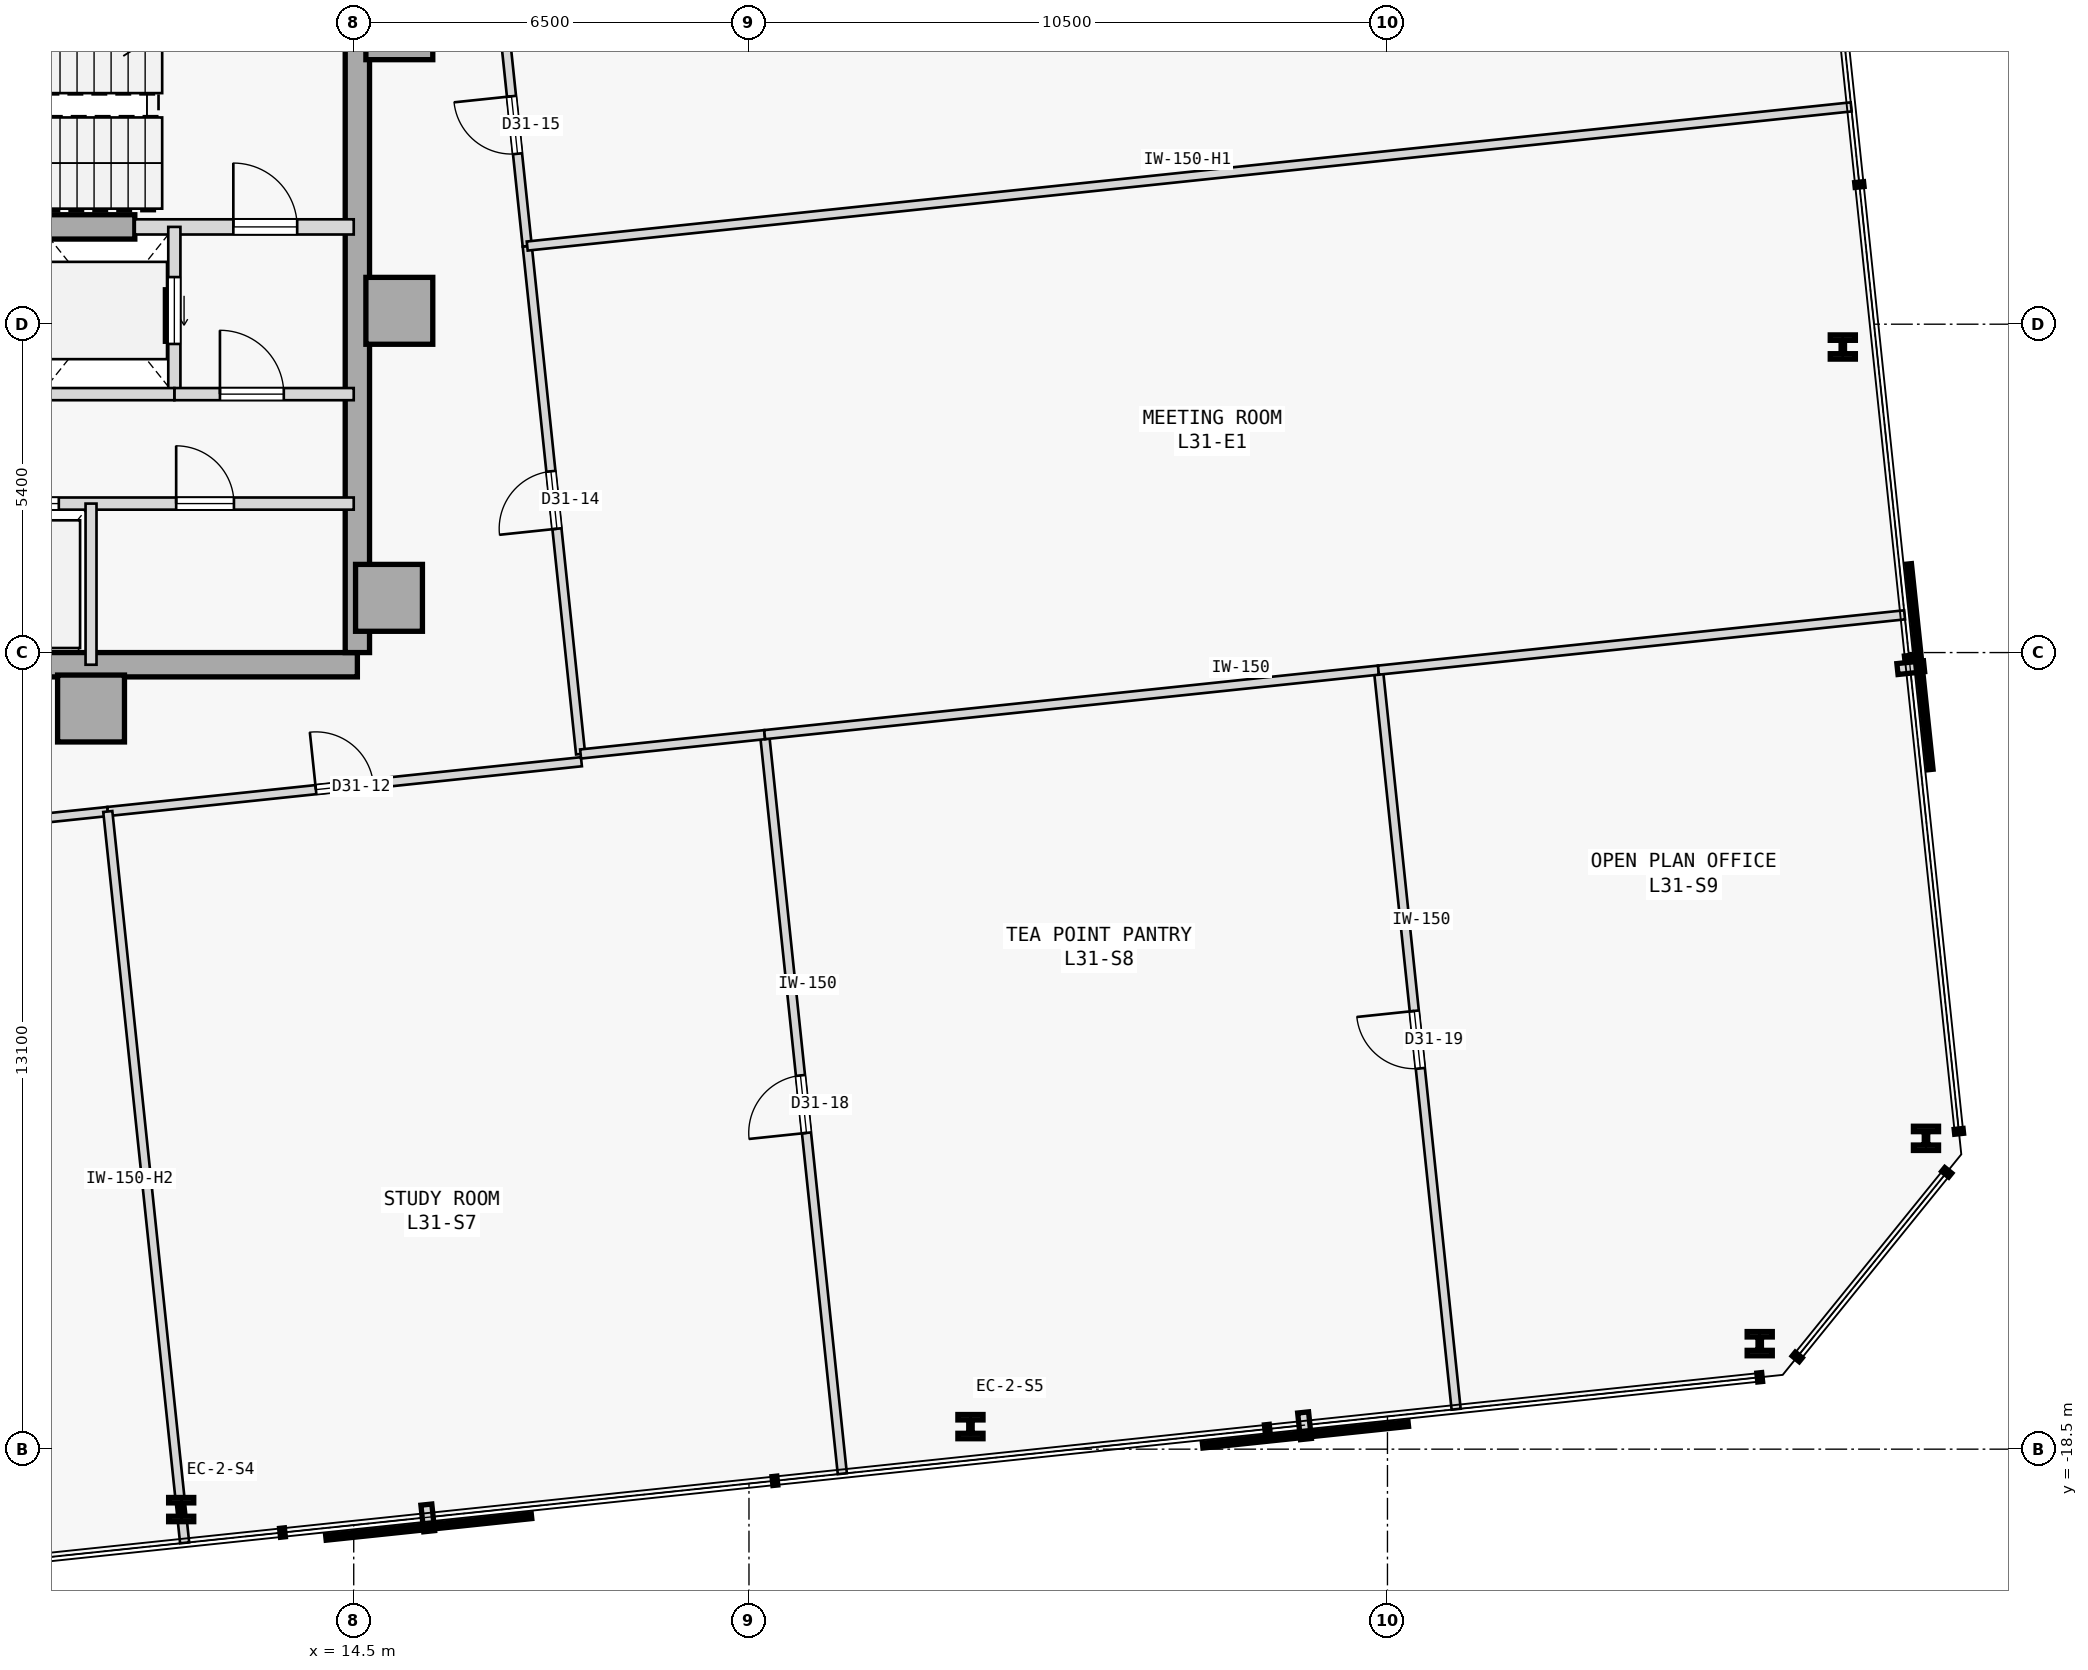
"""IFC4 building model, lengths in metres.
Left out: names, types, materials, properties, quantities, classifications, styles, units other than length and angle.
Written with IfcOpenShell. Run it as: python <this file> out.ifc"""

import sys

from ifc_helpers import new_model, si_unit, direction, frame, frame_2d, origin, origin_2d, place, context, subcontext, project, spatial, rectangle, i_section, extrude, element, fill, save


model = new_model("IFC4")
c1 = context("Model", 3, precision=1e-05, world=origin(), true_north=direction((0.0, 1.0)))
c2 = subcontext(c1, "Body", "Model", "MODEL_VIEW")
j1 = project(units=[si_unit("LENGTHUNIT", "METRE"), si_unit("PLANEANGLEUNIT", "RADIAN")], contexts=[c1])
p1 = place(None, origin())
s1 = spatial("IfcSite", under=j1, at=p1, CompositionType="ELEMENT")
p2 = place(p1, origin())
s2 = spatial("IfcBuilding", under=s1, at=p2, CompositionType="ELEMENT")
p3 = place(p2, frame((0.0, 0.0, 124.4)))
s3 = spatial("IfcBuildingStorey", under=s2, at=p3, CompositionType="ELEMENT", Elevation=124.4)
for number, where, z_axis, x_axis in (
    (1, (15.25, 4.9, 0.0), (0.0, 0.0, 1.0), (1.0, 0.0, 0.0)),
    (2, (15.25, 0.22, 0.0), (0.0, 0.0, 1.0), (1.0, 0.0, 0.0)),
    (3, (15.08, -4.5, 0.0), (0.0, 0.0, 1.0), (1.0, 0.0, 0.0)),
    (4, (10.18, -6.32, 0.0), (0.0, 0.0, 1.0), (1.0, 0.0, 0.0)),
):
    element("IfcColumn", number, at=place(p3, frame(where, z_axis=z_axis, x_axis=x_axis)), inside=s3, PredefinedType="COLUMN", context=c2, shape_type="SweptSolid", body=[
        extrude(rectangle(XDim=1.1, YDim=1.1, at=origin_2d()), origin(), (0.0, 0.0, 1.0), 3.7),
    ])
p4 = place(p3, frame((3.7, -5.6, 0.0), z_axis=(0.0, 0.0, 1.0), x_axis=(1.0, 0.0, 0.0)))
e5 = element("IfcWall", 5, at=p4, inside=s3, PredefinedType="SHEAR", context=c2, shape_type="SweptSolid", body=[
    extrude(rectangle(XDim=10.86, YDim=0.4, at=frame_2d((5.43, 0.0))), origin(), (0.0, 0.0, 1.0), 3.475),
])
p5 = place(p3, frame((14.56, -5.4, 0.0), z_axis=(0.0, 0.0, 1.0), x_axis=(0.0, 1.0, 0.0)))
e6 = element("IfcWall", 6, at=p5, inside=s3, PredefinedType="SHEAR", context=c2, shape_type="SweptSolid", body=[
    extrude(rectangle(XDim=10.8, YDim=0.4, at=frame_2d((5.4, 0.0))), origin(), (0.0, 0.0, 1.0), 3.475),
])
p6 = place(p3, frame((5.75, 1.6, 0.0), z_axis=(0.0, 0.0, 1.0), x_axis=(1.0, 0.0, 0.0)))
e7 = element("IfcWall", 7, at=p6, inside=s3, PredefinedType="SHEAR", context=c2, shape_type="SweptSolid", body=[
    extrude(rectangle(XDim=5.15, YDim=0.4, at=frame_2d((2.575, 0.0))), origin(), (0.0, 0.0, 1.0), 3.475),
])
for number, where, z_axis, x_axis in (
    (8, (11.663, -19.494, 0.0), (0.0, 0.0, 1.0), (1.0, 0.0, 0.0)),
    (9, (24.642, -18.129, 0.0), (0.0, 0.0, 1.0), (1.0, 0.0, 0.0)),
    (10, (37.622, -16.765, 0.0), (0.0, 0.0, 1.0), (1.0, 0.0, 0.0)),
    (11, (40.356, -13.389, 0.0), (0.0, 0.0, 1.0), (1.0, 0.0, 0.0)),
    (12, (38.988, -0.375, 0.0), (0.0, 0.0, 1.0), (1.0, 0.0, 0.0)),
):
    element("IfcColumn", number, at=place(p3, frame(where, z_axis=z_axis, x_axis=x_axis)), inside=s3, PredefinedType="COLUMN", context=c2, shape_type="SweptSolid", body=[
        extrude(i_section(OverallWidth=0.413, OverallDepth=0.398, WebThickness=0.056, FlangeThickness=0.089, FilletRadius=0.015, at=origin_2d()), origin(), (0.0, 0.0, 1.0), 3.7),
    ])
p7 = place(p3, frame((10.9, 1.6, 0.0), z_axis=(0.0, 0.0, 1.0), x_axis=(1.0, 0.0, 0.0)))
e13 = element("IfcWall", 13, at=p7, inside=s3, PredefinedType="STANDARD", context=c2, shape_type="SweptSolid", body=[
    extrude(rectangle(XDim=3.6, YDim=0.25, at=frame_2d((1.8, 0.0))), origin(), (0.0, 0.0, 1.0), 3.475),
])
p8 = place(p7, frame((1.62, 0.0, 0.0)))
e14 = element("IfcOpeningElement", 14, at=p8, cuts=e13, PredefinedType="OPENING", context=c2, shape_type="SweptSolid", body=[
    extrude(rectangle(XDim=1.05, YDim=2.15, at=frame_2d((0.525, 1.075))), frame((0.0, 0.135, 0.0), z_axis=(0.0, -1.0, 0.0), x_axis=(1.0, 0.0, 0.0)), (0.0, 0.0, 1.0), 0.27),
])
p9 = place(p3, frame((11.55, -1.15, 0.0), z_axis=(0.0, 0.0, 1.0), x_axis=(0.0, 1.0, 0.0)))
e15 = element("IfcWall", 15, at=p9, inside=s3, PredefinedType="STANDARD", context=c2, shape_type="SweptSolid", body=[
    extrude(rectangle(XDim=2.75, YDim=0.2, at=frame_2d((1.375, 0.0))), origin(), (0.0, 0.0, 1.0), 3.475),
])
p10 = place(p9, frame((0.825, 0.0, 0.0)))
e16 = element("IfcOpeningElement", 16, at=p10, cuts=e15, PredefinedType="OPENING", context=c2, shape_type="SweptSolid", body=[
    extrude(rectangle(XDim=1.1, YDim=2.15, at=frame_2d((0.55, 1.075))), frame((0.0, 0.11, 0.0), z_axis=(0.0, -1.0, 0.0), x_axis=(1.0, 0.0, 0.0)), (0.0, 0.0, 1.0), 0.22),
])
p11 = place(p3, frame((11.55, -1.15, 0.0), z_axis=(0.0, 0.0, 1.0), x_axis=(1.0, 0.0, 0.0)))
e17 = element("IfcWall", 17, at=p11, inside=s3, PredefinedType="STANDARD", context=c2, shape_type="SweptSolid", body=[
    extrude(rectangle(XDim=2.95, YDim=0.2, at=frame_2d((1.475, 0.0))), origin(), (0.0, 0.0, 1.0), 3.475),
])
p12 = place(p11, frame((0.75, 0.0, 0.0)))
e18 = element("IfcOpeningElement", 18, at=p12, cuts=e17, PredefinedType="OPENING", context=c2, shape_type="SweptSolid", body=[
    extrude(rectangle(XDim=1.05, YDim=2.18, at=frame_2d((0.525, 1.09))), frame((0.0, 0.11, 0.0), z_axis=(0.0, -1.0, 0.0), x_axis=(1.0, 0.0, 0.0)), (0.0, 0.0, 1.0), 0.22),
])
p13 = place(p3, frame((9.35, -1.15, 0.0), z_axis=(0.0, 0.0, 1.0), x_axis=(1.0, 0.0, 0.0)))
e19 = element("IfcWall", 19, at=p13, inside=s3, PredefinedType="STANDARD", context=c2, shape_type="SweptSolid", body=[
    extrude(rectangle(XDim=2.2, YDim=0.2, at=frame_2d((1.1, 0.0))), origin(), (0.0, 0.0, 1.0), 3.475),
])
p14 = place(p3, frame((3.7, -2.95, 0.0), z_axis=(0.0, 0.0, 1.0), x_axis=(1.0, 0.0, 0.0)))
e20 = element("IfcWall", 20, at=p14, inside=s3, PredefinedType="STANDARD", context=c2, shape_type="SweptSolid", body=[
    extrude(rectangle(XDim=10.8, YDim=0.2, at=frame_2d((5.4, 0.0))), origin(), (0.0, 0.0, 1.0), 3.475),
])
p15 = place(p14, frame((2.69, 0.0, 0.0)))
e21 = element("IfcOpeningElement", 21, at=p15, cuts=e20, PredefinedType="OPENING", context=c2, shape_type="SweptSolid", body=[
    extrude(rectangle(XDim=1.1, YDim=2.15, at=frame_2d((0.55, 1.075))), frame((0.0, 0.11, 0.0), z_axis=(0.0, -1.0, 0.0), x_axis=(1.0, 0.0, 0.0)), (0.0, 0.0, 1.0), 0.22),
])
p16 = place(p14, frame((4.85, 0.0, 0.0)))
e22 = element("IfcOpeningElement", 22, at=p16, cuts=e20, PredefinedType="OPENING", context=c2, shape_type="SweptSolid", body=[
    extrude(rectangle(XDim=1.1, YDim=2.15, at=frame_2d((0.55, 1.075))), frame((0.0, 0.11, 0.0), z_axis=(0.0, -1.0, 0.0), x_axis=(1.0, 0.0, 0.0)), (0.0, 0.0, 1.0), 0.22),
])
p17 = place(p14, frame((7.88, 0.0, 0.0)))
e23 = element("IfcOpeningElement", 23, at=p17, cuts=e20, PredefinedType="OPENING", context=c2, shape_type="SweptSolid", body=[
    extrude(rectangle(XDim=0.95, YDim=2.15, at=frame_2d((0.475, 1.075))), frame((0.0, 0.11, 0.0), z_axis=(0.0, -1.0, 0.0), x_axis=(1.0, 0.0, 0.0)), (0.0, 0.0, 1.0), 0.22),
])
p18 = place(p3, frame((10.18, -5.6, 0.0), z_axis=(0.0, 0.0, 1.0), x_axis=(0.0, 1.0, 0.0)))
e24 = element("IfcWall", 24, at=p18, inside=s3, PredefinedType="STANDARD", context=c2, shape_type="SweptSolid", body=[
    extrude(rectangle(XDim=2.65, YDim=0.18, at=frame_2d((1.325, 0.0))), origin(), (0.0, 0.0, 1.0), 3.475),
])
p19 = place(p3, frame((-1.081, -9.226, 0.0), z_axis=(0.0, 0.0, 1.0), x_axis=(0.994523198252, 0.104516066418, 0.0)))
e25 = element("IfcWall", 25, at=p19, inside=s3, PredefinedType="PARTITIONING", context=c2, shape_type="SweptSolid", body=[
    extrude(rectangle(XDim=11.6, YDim=0.15, at=frame_2d((5.8, 0.0))), origin(), (0.0, 0.0, 1.0), 3.475),
])
p20 = place(p19, frame((5.325, 0.0, 0.0)))
e26 = element("IfcOpeningElement", 26, at=p20, cuts=e25, PredefinedType="OPENING", context=c2, shape_type="SweptSolid", body=[
    extrude(rectangle(XDim=0.95, YDim=2.15, at=frame_2d((0.475, 1.075))), frame((0.0, 0.085, 0.0), z_axis=(0.0, -1.0, 0.0), x_axis=(1.0, 0.0, 0.0)), (0.0, 0.0, 1.0), 0.17),
])
p21 = place(p3, frame((10.456, -8.014, 0.0), z_axis=(0.0, 0.0, 1.0), x_axis=(0.994522690965, 0.104520893393, 0.0)))
e27 = element("IfcWall", 27, at=p21, inside=s3, PredefinedType="PARTITIONING", context=c2, shape_type="SweptSolid", body=[
    extrude(rectangle(XDim=7.832, YDim=0.15, at=frame_2d((3.916, 0.0))), origin(), (0.0, 0.0, 1.0), 3.475),
])
p22 = place(p21, frame((3.441, 0.0, 0.0)))
e28 = element("IfcOpeningElement", 28, at=p22, cuts=e27, PredefinedType="OPENING", context=c2, shape_type="SweptSolid", body=[
    extrude(rectangle(XDim=0.95, YDim=2.15, at=frame_2d((0.475, 1.075))), frame((0.0, 0.085, 0.0), z_axis=(0.0, -1.0, 0.0), x_axis=(1.0, 0.0, 0.0)), (0.0, 0.0, 1.0), 0.17),
])
p23 = place(p3, frame((18.231, -7.068, 0.0), z_axis=(0.0, 0.0, 1.0), x_axis=(-0.104527419485, 0.994522005074, 0.0)))
e29 = element("IfcWall", 29, at=p23, inside=s3, PredefinedType="PARTITIONING", context=c2, shape_type="SweptSolid", body=[
    extrude(rectangle(XDim=8.399, YDim=0.15, at=frame_2d((4.199, 0.0))), origin(), (0.0, 0.0, 1.0), 3.475),
])
p24 = place(p23, frame((3.725, 0.0, 0.0)))
e30 = element("IfcOpeningElement", 30, at=p24, cuts=e29, PredefinedType="OPENING", context=c2, shape_type="SweptSolid", body=[
    extrude(rectangle(XDim=0.95, YDim=2.15, at=frame_2d((0.475, 1.075))), frame((0.0, 0.085, 0.0), z_axis=(0.0, -1.0, 0.0), x_axis=(1.0, 0.0, 0.0)), (0.0, 0.0, 1.0), 0.17),
])
p25 = place(p3, frame((17.353, 1.285, 0.0), z_axis=(0.0, 0.0, 1.0), x_axis=(-0.104524753323, 0.994522285292, 0.0)))
e31 = element("IfcWall", 31, at=p25, inside=s3, PredefinedType="PARTITIONING", context=c2, shape_type="SweptSolid", body=[
    extrude(rectangle(XDim=5.718, YDim=0.15, at=frame_2d((2.859, 0.0))), origin(), (0.0, 0.0, 1.0), 3.475),
])
p26 = place(p25, frame((1.526, 0.0, 0.0)))
e32 = element("IfcOpeningElement", 32, at=p26, cuts=e31, PredefinedType="OPENING", context=c2, shape_type="SweptSolid", body=[
    extrude(rectangle(XDim=0.95, YDim=2.15, at=frame_2d((0.475, 1.075))), frame((0.0, 0.085, 0.0), z_axis=(0.0, -1.0, 0.0), x_axis=(1.0, 0.0, 0.0)), (0.0, 0.0, 1.0), 0.17),
])
p27 = place(p3, frame((11.719, -20.041, 0.0), z_axis=(0.0, 0.0, 1.0), x_axis=(-0.104517685722, 0.994523028075, 0.0)))
e33 = element("IfcWall", 33, at=p27, inside=s3, PredefinedType="PARTITIONING", context=c2, shape_type="SweptSolid", body=[
    extrude(rectangle(XDim=12.093, YDim=0.15, at=frame_2d((6.046, 0.0))), origin(), (0.0, 0.0, 1.0), 2.875),
])
p28 = place(p3, frame((22.535, -18.904, 0.0), z_axis=(0.0, 0.0, 1.0), x_axis=(-0.104520477826, 0.99452273464, 0.0)))
e34 = element("IfcWall", 34, at=p28, inside=s3, PredefinedType="PARTITIONING", context=c2, shape_type="SweptSolid", body=[
    extrude(rectangle(XDim=12.221, YDim=0.15, at=frame_2d((6.11, 0.0))), origin(), (0.0, 0.0, 1.0), 3.475),
])
p29 = place(p28, frame((5.635, 0.0, 0.0)))
e35 = element("IfcOpeningElement", 35, at=p29, cuts=e34, PredefinedType="OPENING", context=c2, shape_type="SweptSolid", body=[
    extrude(rectangle(XDim=0.95, YDim=2.15, at=frame_2d((0.475, 1.075))), frame((0.0, 0.085, 0.0), z_axis=(0.0, -1.0, 0.0), x_axis=(1.0, 0.0, 0.0)), (0.0, 0.0, 1.0), 0.17),
])
p30 = place(p3, frame((18.231, -7.068, 0.0), z_axis=(0.0, 0.0, 1.0), x_axis=(0.994520828596, 0.104538612428, 0.0)))
e36 = element("IfcWall", 36, at=p30, inside=s3, PredefinedType="PARTITIONING", context=c2, shape_type="SweptSolid", body=[
    extrude(rectangle(XDim=3.043, YDim=0.15, at=frame_2d((1.521, 0.0))), origin(), (0.0, 0.0, 1.0), 3.475),
])
p31 = place(p3, frame((32.629, -17.843, 0.0), z_axis=(0.0, 0.0, 1.0), x_axis=(-0.104538159751, 0.994520876179, 0.0)))
e37 = element("IfcWall", 37, at=p31, inside=s3, PredefinedType="PARTITIONING", context=c2, shape_type="SweptSolid", body=[
    extrude(rectangle(XDim=12.221, YDim=0.15, at=frame_2d((6.111, 0.0))), origin(), (0.0, 0.0, 1.0), 3.475),
])
p32 = place(p31, frame((5.635, 0.0, 0.0)))
e38 = element("IfcOpeningElement", 38, at=p32, cuts=e37, PredefinedType="OPENING", context=c2, shape_type="SweptSolid", body=[
    extrude(rectangle(XDim=0.95, YDim=2.15, at=frame_2d((0.475, 1.075))), frame((0.0, 0.085, 0.0), z_axis=(0.0, -1.0, 0.0), x_axis=(1.0, 0.0, 0.0)), (0.0, 0.0, 1.0), 0.17),
])
p33 = place(p3, frame((21.258, -6.75, 0.0), z_axis=(0.0, 0.0, 1.0), x_axis=(0.994520994424, 0.104537034822, 0.0)))
e39 = element("IfcWall", 39, at=p33, inside=s3, PredefinedType="PARTITIONING", context=c2, shape_type="SweptSolid", body=[
    extrude(rectangle(XDim=10.15, YDim=0.15, at=frame_2d((5.075, 0.0))), origin(), (0.0, 0.0, 1.0), 3.475),
])
p34 = place(p3, frame((31.352, -5.689, 0.0), z_axis=(0.0, 0.0, 1.0), x_axis=(0.994521893041, 0.104528485415, 0.0)))
e40 = element("IfcWall", 40, at=p34, inside=s3, PredefinedType="PARTITIONING", context=c2, shape_type="SweptSolid", body=[
    extrude(rectangle(XDim=8.7, YDim=0.15, at=frame_2d((4.35, 0.0))), origin(), (0.0, 0.0, 1.0), 3.475),
])
p35 = place(p3, frame((17.353, 1.285, 0.0), z_axis=(0.0, 0.0, 1.0), x_axis=(0.994522365919, 0.104523986183, 0.0)))
e41 = element("IfcWall", 41, at=p35, inside=s3, PredefinedType="PARTITIONING", context=c2, shape_type="SweptSolid", body=[
    extrude(rectangle(XDim=21.893, YDim=0.15, at=frame_2d((10.946, 0.0))), origin(), (0.0, 0.0, 1.0), 3.025),
])
p36 = place(p8, origin())
e42 = element("IfcDoor", 42, at=p36, inside=s3, OperationType="SINGLE_SWING_LEFT", PredefinedType="DOOR", context=c2, shape_type="SweptSolid", body=[
    extrude(rectangle(XDim=1.05, YDim=2.15, at=frame_2d((0.525, 1.075))), frame((0.0, 0.025, 0.0), z_axis=(0.0, -1.0, 0.0), x_axis=(1.0, 0.0, 0.0)), (0.0, 0.0, 1.0), 0.05),
])
fill(e14, e42)
p37 = place(p12, origin())
e43 = element("IfcDoor", 43, at=p37, inside=s3, OperationType="SINGLE_SWING_LEFT", PredefinedType="DOOR", context=c2, shape_type="SweptSolid", body=[
    extrude(rectangle(XDim=1.05, YDim=2.18, at=frame_2d((0.525, 1.09))), frame((0.0, 0.025, 0.0), z_axis=(0.0, -1.0, 0.0), x_axis=(1.0, 0.0, 0.0)), (0.0, 0.0, 1.0), 0.05),
])
fill(e18, e43)
p38 = place(p10, origin())
e44 = element("IfcDoor", 44, at=p38, inside=s3, OperationType="SLIDING_TO_RIGHT", PredefinedType="DOOR", context=c2, shape_type="SweptSolid", body=[
    extrude(rectangle(XDim=1.1, YDim=2.15, at=frame_2d((0.55, 1.075))), frame((0.0, 0.025, 0.0), z_axis=(0.0, -1.0, 0.0), x_axis=(1.0, 0.0, 0.0)), (0.0, 0.0, 1.0), 0.05),
])
fill(e16, e44)
p39 = place(p16, origin())
e45 = element("IfcDoor", 45, at=p39, inside=s3, OperationType="SLIDING_TO_RIGHT", PredefinedType="DOOR", context=c2, shape_type="SweptSolid", body=[
    extrude(rectangle(XDim=1.1, YDim=2.15, at=frame_2d((0.55, 1.075))), frame((0.0, 0.025, 0.0), z_axis=(0.0, -1.0, 0.0), x_axis=(1.0, 0.0, 0.0)), (0.0, 0.0, 1.0), 0.05),
])
fill(e22, e45)
p40 = place(p17, origin())
e46 = element("IfcDoor", 46, at=p40, inside=s3, OperationType="SINGLE_SWING_LEFT", PredefinedType="DOOR", context=c2, shape_type="SweptSolid", body=[
    extrude(rectangle(XDim=0.95, YDim=2.15, at=frame_2d((0.475, 1.075))), frame((0.0, 0.025, 0.0), z_axis=(0.0, -1.0, 0.0), x_axis=(1.0, 0.0, 0.0)), (0.0, 0.0, 1.0), 0.05),
])
fill(e23, e46)
p41 = place(p22, origin())
e47 = element("IfcDoor", 47, at=p41, inside=s3, OperationType="SINGLE_SWING_LEFT", PredefinedType="DOOR", context=c2, shape_type="SweptSolid", body=[
    extrude(rectangle(XDim=0.95, YDim=2.15, at=frame_2d((0.475, 1.075))), frame((0.0, 0.025, 0.0), z_axis=(0.0, -1.0, 0.0), x_axis=(1.0, 0.0, 0.0)), (0.0, 0.0, 1.0), 0.05),
])
fill(e28, e47)
p42 = place(p24, origin())
e48 = element("IfcDoor", 48, at=p42, inside=s3, OperationType="SINGLE_SWING_LEFT", PredefinedType="DOOR", context=c2, shape_type="SweptSolid", body=[
    extrude(rectangle(XDim=0.95, YDim=2.15, at=frame_2d((0.475, 1.075))), frame((0.0, 0.025, 0.0), z_axis=(0.0, -1.0, 0.0), x_axis=(1.0, 0.0, 0.0)), (0.0, 0.0, 1.0), 0.05),
])
fill(e30, e48)
p43 = place(p26, origin())
e49 = element("IfcDoor", 49, at=p43, inside=s3, OperationType="SINGLE_SWING_RIGHT", PredefinedType="DOOR", context=c2, shape_type="SweptSolid", body=[
    extrude(rectangle(XDim=0.95, YDim=2.15, at=frame_2d((0.475, 1.075))), frame((0.0, 0.025, 0.0), z_axis=(0.0, -1.0, 0.0), x_axis=(1.0, 0.0, 0.0)), (0.0, 0.0, 1.0), 0.05),
])
fill(e32, e49)
p44 = place(p29, origin())
e50 = element("IfcDoor", 50, at=p44, inside=s3, OperationType="SINGLE_SWING_LEFT", PredefinedType="DOOR", context=c2, shape_type="SweptSolid", body=[
    extrude(rectangle(XDim=0.95, YDim=2.15, at=frame_2d((0.475, 1.075))), frame((0.0, 0.025, 0.0), z_axis=(0.0, -1.0, 0.0), x_axis=(1.0, 0.0, 0.0)), (0.0, 0.0, 1.0), 0.05),
])
fill(e35, e50)
p45 = place(p32, origin())
e51 = element("IfcDoor", 51, at=p45, inside=s3, OperationType="SINGLE_SWING_RIGHT", PredefinedType="DOOR", context=c2, shape_type="SweptSolid", body=[
    extrude(rectangle(XDim=0.95, YDim=2.15, at=frame_2d((0.475, 1.075))), frame((0.0, 0.025, 0.0), z_axis=(0.0, -1.0, 0.0), x_axis=(1.0, 0.0, 0.0)), (0.0, 0.0, 1.0), 0.05),
])
fill(e38, e51)
save(model, sys.argv[1])
